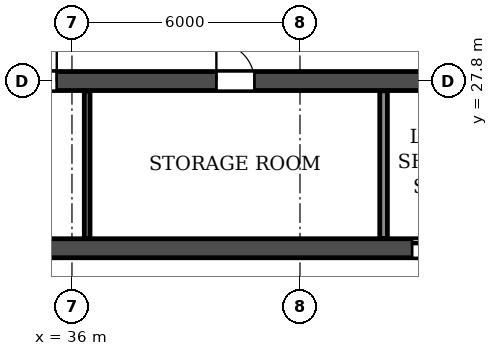
"""IFC4 building model, lengths in metres.
Left out: names, types, materials, properties, quantities, classifications, styles, units other than length and angle.
Written with IfcOpenShell. Run it as: python <this file> out.ifc"""

import sys

from ifc_helpers import new_model, si_unit, direction, frame, frame_2d, origin, place, context, subcontext, project, spatial, rectangle, extrude, element, fill, save


model = new_model("IFC4")
c1 = context("Model", 3, precision=1e-05, world=origin(), true_north=direction((0.0, 1.0)))
c2 = subcontext(c1, "Body", "Model", "MODEL_VIEW")
j1 = project(units=[si_unit("LENGTHUNIT", "METRE"), si_unit("PLANEANGLEUNIT", "RADIAN")], contexts=[c1])
p1 = place(None, origin())
s1 = spatial("IfcSite", under=j1, at=p1, CompositionType="ELEMENT")
p2 = place(p1, origin())
s2 = spatial("IfcBuilding", under=s1, at=p2, CompositionType="ELEMENT")
p3 = place(p2, frame((0.0, 0.0, 92.7)))
s3 = spatial("IfcBuildingStorey", under=s2, at=p3, CompositionType="ELEMENT", Elevation=92.7)
p4 = place(p3, frame((8.6, 27.8, 0.0), z_axis=(0.0, 0.0, 1.0), x_axis=(1.0, 0.0, 0.0)))
e1 = element("IfcWall", 1, at=p4, inside=s3, PredefinedType="SOLIDWALL", context=c2, shape_type="SweptSolid", body=[
    extrude(rectangle(XDim=84.8, YDim=0.5, at=frame_2d((42.4, 0.0))), origin(), (0.0, 0.0, 1.0), 3.06),
])
p5 = place(p4, frame((0.9, 0.0, 0.0)))
e2 = element("IfcOpeningElement", 2, at=p5, cuts=e1, PredefinedType="OPENING", context=c2, shape_type="SweptSolid", body=[
    extrude(rectangle(XDim=1.0, YDim=2.1, at=frame_2d((0.5, 1.05))), frame((0.0, 0.26, 0.0), z_axis=(0.0, -1.0, 0.0), x_axis=(1.0, 0.0, 0.0)), (0.0, 0.0, 1.0), 0.52),
])
p6 = place(p4, frame((5.6, 0.0, 0.0)))
e3 = element("IfcOpeningElement", 3, at=p6, cuts=e1, PredefinedType="OPENING", context=c2, shape_type="SweptSolid", body=[
    extrude(rectangle(XDim=1.0, YDim=2.1, at=frame_2d((0.5, 1.05))), frame((0.0, 0.26, 0.0), z_axis=(0.0, -1.0, 0.0), x_axis=(1.0, 0.0, 0.0)), (0.0, 0.0, 1.0), 0.52),
])
p7 = place(p4, frame((10.3, 0.0, 0.0)))
e4 = element("IfcOpeningElement", 4, at=p7, cuts=e1, PredefinedType="OPENING", context=c2, shape_type="SweptSolid", body=[
    extrude(rectangle(XDim=1.0, YDim=2.1, at=frame_2d((0.5, 1.05))), frame((0.0, 0.26, 0.0), z_axis=(0.0, -1.0, 0.0), x_axis=(1.0, 0.0, 0.0)), (0.0, 0.0, 1.0), 0.52),
])
p8 = place(p4, frame((13.65, 0.0, 0.0)))
e5 = element("IfcOpeningElement", 5, at=p8, cuts=e1, PredefinedType="OPENING", context=c2, shape_type="SweptSolid", body=[
    extrude(rectangle(XDim=0.9, YDim=2.1, at=frame_2d((0.45, 1.05))), frame((0.0, 0.26, 0.0), z_axis=(0.0, -1.0, 0.0), x_axis=(1.0, 0.0, 0.0)), (0.0, 0.0, 1.0), 0.52),
])
p9 = place(p4, frame((22.85, 0.0, 0.0)))
e6 = element("IfcOpeningElement", 6, at=p9, cuts=e1, PredefinedType="OPENING", context=c2, shape_type="SweptSolid", body=[
    extrude(rectangle(XDim=0.9, YDim=2.1, at=frame_2d((0.45, 1.05))), frame((0.0, 0.26, 0.0), z_axis=(0.0, -1.0, 0.0), x_axis=(1.0, 0.0, 0.0)), (0.0, 0.0, 1.0), 0.52),
])
p10 = place(p4, frame((26.0, 0.0, 0.0)))
e7 = element("IfcOpeningElement", 7, at=p10, cuts=e1, PredefinedType="OPENING", context=c2, shape_type="SweptSolid", body=[
    extrude(rectangle(XDim=1.0, YDim=2.1, at=frame_2d((0.5, 1.05))), frame((0.0, 0.26, 0.0), z_axis=(0.0, -1.0, 0.0), x_axis=(1.0, 0.0, 0.0)), (0.0, 0.0, 1.0), 0.52),
])
p11 = place(p4, frame((31.2, 0.0, 0.0)))
e8 = element("IfcOpeningElement", 8, at=p11, cuts=e1, PredefinedType="OPENING", context=c2, shape_type="SweptSolid", body=[
    extrude(rectangle(XDim=1.0, YDim=2.1, at=frame_2d((0.5, 1.05))), frame((0.0, 0.26, 0.0), z_axis=(0.0, -1.0, 0.0), x_axis=(1.0, 0.0, 0.0)), (0.0, 0.0, 1.0), 0.52),
])
p12 = place(p4, frame((39.0, 0.0, 0.0)))
e9 = element("IfcOpeningElement", 9, at=p12, cuts=e1, PredefinedType="OPENING", context=c2, shape_type="SweptSolid", body=[
    extrude(rectangle(XDim=1.0, YDim=2.1, at=frame_2d((0.5, 1.05))), frame((0.0, 0.26, 0.0), z_axis=(0.0, -1.0, 0.0), x_axis=(1.0, 0.0, 0.0)), (0.0, 0.0, 1.0), 0.52),
])
p13 = place(p4, frame((41.9, 0.0, 0.0)))
e10 = element("IfcOpeningElement", 10, at=p13, cuts=e1, PredefinedType="OPENING", context=c2, shape_type="SweptSolid", body=[
    extrude(rectangle(XDim=1.0, YDim=2.1, at=frame_2d((0.5, 1.05))), frame((0.0, 0.26, 0.0), z_axis=(0.0, -1.0, 0.0), x_axis=(1.0, 0.0, 0.0)), (0.0, 0.0, 1.0), 0.52),
])
p14 = place(p4, frame((46.1, 0.0, 0.0)))
e11 = element("IfcOpeningElement", 11, at=p14, cuts=e1, PredefinedType="OPENING", context=c2, shape_type="SweptSolid", body=[
    extrude(rectangle(XDim=1.0, YDim=2.1, at=frame_2d((0.5, 1.05))), frame((0.0, 0.26, 0.0), z_axis=(0.0, -1.0, 0.0), x_axis=(1.0, 0.0, 0.0)), (0.0, 0.0, 1.0), 0.52),
])
p15 = place(p4, frame((50.0, 0.0, 0.0)))
e12 = element("IfcOpeningElement", 12, at=p15, cuts=e1, PredefinedType="OPENING", context=c2, shape_type="SweptSolid", body=[
    extrude(rectangle(XDim=1.0, YDim=2.1, at=frame_2d((0.5, 1.05))), frame((0.0, 0.26, 0.0), z_axis=(0.0, -1.0, 0.0), x_axis=(1.0, 0.0, 0.0)), (0.0, 0.0, 1.0), 0.52),
])
p16 = place(p4, frame((52.6, 0.0, 0.0)))
e13 = element("IfcOpeningElement", 13, at=p16, cuts=e1, PredefinedType="OPENING", context=c2, shape_type="SweptSolid", body=[
    extrude(rectangle(XDim=1.0, YDim=2.1, at=frame_2d((0.5, 1.05))), frame((0.0, 0.26, 0.0), z_axis=(0.0, -1.0, 0.0), x_axis=(1.0, 0.0, 0.0)), (0.0, 0.0, 1.0), 0.52),
])
p17 = place(p4, frame((56.25, 0.0, 0.0)))
e14 = element("IfcOpeningElement", 14, at=p17, cuts=e1, PredefinedType="OPENING", context=c2, shape_type="SweptSolid", body=[
    extrude(rectangle(XDim=1.5, YDim=2.1, at=frame_2d((0.75, 1.05))), frame((0.0, 0.26, 0.0), z_axis=(0.0, -1.0, 0.0), x_axis=(1.0, 0.0, 0.0)), (0.0, 0.0, 1.0), 0.52),
])
p18 = place(p4, frame((61.05, 0.0, 0.0)))
e15 = element("IfcOpeningElement", 15, at=p18, cuts=e1, PredefinedType="OPENING", context=c2, shape_type="SweptSolid", body=[
    extrude(rectangle(XDim=0.9, YDim=2.1, at=frame_2d((0.45, 1.05))), frame((0.0, 0.26, 0.0), z_axis=(0.0, -1.0, 0.0), x_axis=(1.0, 0.0, 0.0)), (0.0, 0.0, 1.0), 0.52),
])
p19 = place(p4, frame((70.25, 0.0, 0.0)))
e16 = element("IfcOpeningElement", 16, at=p19, cuts=e1, PredefinedType="OPENING", context=c2, shape_type="SweptSolid", body=[
    extrude(rectangle(XDim=0.9, YDim=2.1, at=frame_2d((0.45, 1.05))), frame((0.0, 0.26, 0.0), z_axis=(0.0, -1.0, 0.0), x_axis=(1.0, 0.0, 0.0)), (0.0, 0.0, 1.0), 0.52),
])
p20 = place(p4, frame((73.5, 0.0, 0.0)))
e17 = element("IfcOpeningElement", 17, at=p20, cuts=e1, PredefinedType="OPENING", context=c2, shape_type="SweptSolid", body=[
    extrude(rectangle(XDim=1.0, YDim=2.1, at=frame_2d((0.5, 1.05))), frame((0.0, 0.26, 0.0), z_axis=(0.0, -1.0, 0.0), x_axis=(1.0, 0.0, 0.0)), (0.0, 0.0, 1.0), 0.52),
])
p21 = place(p4, frame((79.6, 0.0, 0.0)))
e18 = element("IfcOpeningElement", 18, at=p21, cuts=e1, PredefinedType="OPENING", context=c2, shape_type="SweptSolid", body=[
    extrude(rectangle(XDim=1.0, YDim=2.1, at=frame_2d((0.5, 1.05))), frame((0.0, 0.26, 0.0), z_axis=(0.0, -1.0, 0.0), x_axis=(1.0, 0.0, 0.0)), (0.0, 0.0, 1.0), 0.52),
])
p22 = place(p3, frame((33.925, 23.4, 0.0), z_axis=(0.0, 0.0, 1.0), x_axis=(1.0, 0.0, 0.0)))
e19 = element("IfcWall", 19, at=p22, inside=s3, PredefinedType="SOLIDWALL", context=c2, shape_type="SweptSolid", body=[
    extrude(rectangle(XDim=34.15, YDim=0.5, at=frame_2d((17.075, 0.0))), origin(), (0.0, 0.0, 1.0), 3.06),
])
p23 = place(p22, frame((16.175, 0.0, 0.0)))
e20 = element("IfcOpeningElement", 20, at=p23, cuts=e19, PredefinedType="OPENING", context=c2, shape_type="SweptSolid", body=[
    extrude(rectangle(XDim=1.8, YDim=2.1, at=frame_2d((0.9, 1.05))), frame((0.0, 0.26, 0.0), z_axis=(0.0, -1.0, 0.0), x_axis=(1.0, 0.0, 0.0)), (0.0, 0.0, 1.0), 0.52),
])
p24 = place(p22, frame((11.025, 0.0, 0.0)))
e21 = element("IfcOpeningElement", 21, at=p24, cuts=e19, PredefinedType="OPENING", context=c2, shape_type="SweptSolid", body=[
    extrude(rectangle(XDim=1.1, YDim=2.1, at=frame_2d((0.55, 1.05))), frame((0.0, 0.26, 0.0), z_axis=(0.0, -1.0, 0.0), x_axis=(1.0, 0.0, 0.0)), (0.0, 0.0, 1.0), 0.52),
])
p25 = place(p3, frame((36.4, 23.66, 0.0), z_axis=(0.0, 0.0, 1.0), x_axis=(0.0, 1.0, 0.0)))
e22 = element("IfcWall", 22, at=p25, inside=s3, PredefinedType="PARTITIONING", context=c2, shape_type="SweptSolid", body=[
    extrude(rectangle(XDim=3.88, YDim=0.15, at=frame_2d((1.94, 0.0))), origin(), (0.0, 0.0, 1.0), 3.06),
])
p26 = place(p3, frame((44.2, 23.66, 0.0), z_axis=(0.0, 0.0, 1.0), x_axis=(0.0, 1.0, 0.0)))
e23 = element("IfcWall", 23, at=p26, inside=s3, PredefinedType="PARTITIONING", context=c2, shape_type="SweptSolid", body=[
    extrude(rectangle(XDim=3.88, YDim=0.2, at=frame_2d((1.94, 0.0))), origin(), (0.0, 0.0, 1.0), 3.06),
])
p27 = place(p10, origin())
e24 = element("IfcDoor", 24, at=p27, inside=s3, OperationType="SINGLE_SWING_RIGHT", PredefinedType="DOOR", context=c2, shape_type="SweptSolid", body=[
    extrude(rectangle(XDim=1.0, YDim=2.1, at=frame_2d((0.5, 1.05))), frame((0.0, 0.025, 0.0), z_axis=(0.0, -1.0, 0.0), x_axis=(1.0, 0.0, 0.0)), (0.0, 0.0, 1.0), 0.05),
])
fill(e7, e24)
p28 = place(p11, origin())
e25 = element("IfcDoor", 25, at=p28, inside=s3, OperationType="SINGLE_SWING_LEFT", PredefinedType="DOOR", context=c2, shape_type="SweptSolid", body=[
    extrude(rectangle(XDim=1.0, YDim=2.1, at=frame_2d((0.5, 1.05))), frame((0.0, 0.025, 0.0), z_axis=(0.0, -1.0, 0.0), x_axis=(1.0, 0.0, 0.0)), (0.0, 0.0, 1.0), 0.05),
])
fill(e8, e25)
p29 = place(p24, origin())
e26 = element("IfcDoor", 26, at=p29, inside=s3, OperationType="DOUBLE_DOOR_SLIDING", PredefinedType="DOOR", context=c2, shape_type="SweptSolid", body=[
    extrude(rectangle(XDim=1.1, YDim=2.1, at=frame_2d((0.55, 1.05))), frame((0.0, 0.025, 0.0), z_axis=(0.0, -1.0, 0.0), x_axis=(1.0, 0.0, 0.0)), (0.0, 0.0, 1.0), 0.05),
])
fill(e21, e26)
save(model, sys.argv[1])
